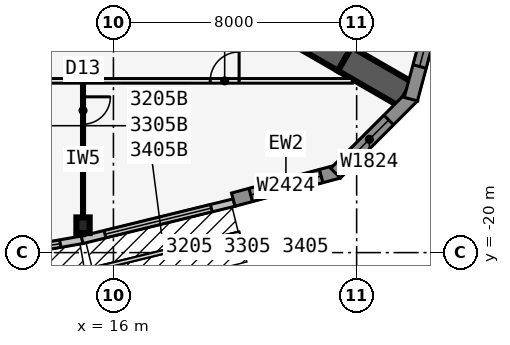
"""IFC4 building model, lengths in metres.
Left out: names, types, materials, properties, quantities, classifications, styles, units other than length and angle.
Written with IfcOpenShell. Run it as: python <this file> out.ifc"""

import sys

from ifc_helpers import new_model, si_unit, direction, frame, frame_2d, origin, origin_2d, place, context, subcontext, project, spatial, polyline, rectangle, i_section, outline, extrude, element, fill, save


model = new_model("IFC4")
c1 = context("Model", 3, precision=1e-05, world=origin(), true_north=direction((0.0, 1.0)))
c2 = subcontext(c1, "Body", "Model", "MODEL_VIEW")
j1 = project(units=[si_unit("LENGTHUNIT", "METRE"), si_unit("PLANEANGLEUNIT", "RADIAN")], contexts=[c1])
p1 = place(None, origin())
s1 = spatial("IfcSite", under=j1, at=p1, CompositionType="ELEMENT")
p2 = place(p1, origin())
s2 = spatial("IfcBuilding", under=s1, at=p2, CompositionType="ELEMENT")
p3 = place(p2, frame((0.0, 0.0, 124.9)))
s3 = spatial("IfcBuildingStorey", under=s2, at=p3, CompositionType="ELEMENT", Elevation=124.9)
for number, where, z_axis, x_axis in (
    (1, (21.61, -12.477, 0.0), (0.0, 0.0, 1.0), (0.866, -0.5, 0.0)),
    (2, (23.61, -13.631, 0.0), (0.0, 0.0, 1.0), (0.866, -0.5, 0.0)),
):
    element("IfcWall", number, at=place(p3, frame(where, z_axis=z_axis, x_axis=x_axis)), inside=s3, PredefinedType="SHEAR", context=c2, shape_type="SweptSolid", body=[
        extrude(rectangle(XDim=2.309, YDim=0.9, at=frame_2d((1.155, 0.0))), origin(), (0.0, 0.0, 1.0), 3.4),
    ])
p4 = place(p3, frame((15.0, -19.1, 0.0), z_axis=(0.0, 0.0, 1.0), x_axis=(1.0, 0.0, 0.0)))
e3 = element("IfcColumn", 3, at=p4, inside=s3, PredefinedType="COLUMN", context=c2, shape_type="SweptSolid", body=[
    extrude(i_section(OverallWidth=0.437, OverallDepth=0.513, WebThickness=0.061, FlangeThickness=0.097, at=origin_2d()), origin(), (0.0, 0.0, 1.0), 3.4),
])
p5 = place(p3, frame((9.979, -20.452, 0.0), z_axis=(0.0, 0.0, 1.0), x_axis=(0.985030467156, 0.172380331752, 0.0)))
e4 = element("IfcWall", 4, at=p5, inside=s3, PredefinedType="STANDARD", context=c2, shape_type="SweptSolid", body=[
    extrude(rectangle(XDim=5.076, YDim=0.25, at=frame_2d((2.538, 0.0))), origin(), (0.0, 0.0, 1.0), 3.235),
])
p6 = place(p5, frame((0.738, 0.0, 0.45)))
e5 = element("IfcOpeningElement", 5, at=p6, cuts=e4, PredefinedType="OPENING", context=c2, shape_type="SweptSolid", body=[
    extrude(rectangle(XDim=3.6, YDim=2.4, at=frame_2d((1.8, 1.2))), frame((0.0, 0.135, 0.0), z_axis=(0.0, -1.0, 0.0), x_axis=(1.0, 0.0, 0.0)), (0.0, 0.0, 1.0), 0.27),
])
p7 = place(p3, frame((14.97, -19.579, 0.0), z_axis=(0.0, 0.0, 1.0), x_axis=(0.971270024053, 0.237980126011, 0.0)))
e6 = element("IfcWall", 6, at=p7, inside=s3, PredefinedType="STANDARD", context=c2, shape_type="SweptSolid", body=[
    extrude(rectangle(XDim=5.148, YDim=0.25, at=frame_2d((2.574, 0.0))), origin(), (0.0, 0.0, 1.0), 3.235),
])
p8 = place(p7, frame((0.774, 0.0, 0.45)))
e7 = element("IfcOpeningElement", 7, at=p8, cuts=e6, PredefinedType="OPENING", context=c2, shape_type="SweptSolid", body=[
    extrude(rectangle(XDim=3.6, YDim=2.4, at=frame_2d((1.8, 1.2))), frame((0.0, 0.135, 0.0), z_axis=(0.0, -1.0, 0.0), x_axis=(1.0, 0.0, 0.0)), (0.0, 0.0, 1.0), 0.27),
])
p9 = place(p3, frame((19.942, -18.258, 0.0), z_axis=(0.0, 0.0, 1.0), x_axis=(0.965924653531, 0.258823421857, 0.0)))
e8 = element("IfcWall", 8, at=p9, inside=s3, PredefinedType="SOLIDWALL", context=c2, shape_type="SweptSolid", body=[
    extrude(rectangle(XDim=3.586, YDim=0.45, at=frame_2d((1.793, 0.0))), origin(), (0.0, 0.0, 1.0), 3.235),
])
p10 = place(p9, frame((0.593, 0.0, 0.45)))
e9 = element("IfcOpeningElement", 9, at=p10, cuts=e8, PredefinedType="OPENING", context=c2, shape_type="SweptSolid", body=[
    extrude(rectangle(XDim=2.4, YDim=2.4, at=frame_2d((1.2, 1.2))), frame((0.0, 0.235, 0.0), z_axis=(0.0, -1.0, 0.0), x_axis=(1.0, 0.0, 0.0)), (0.0, 0.0, 1.0), 0.47),
])
p11 = place(p3, frame((23.305, -17.388, 0.0), z_axis=(0.0, 0.0, 1.0), x_axis=(0.707106781187, 0.707106781187, 0.0)))
e10 = element("IfcWall", 10, at=p11, inside=s3, PredefinedType="SOLIDWALL", context=c2, shape_type="SweptSolid", body=[
    extrude(outline(polyline([(3.586, 0.225), (3.527, 0.225), (3.035, 0.093), (3.0, 0.225), (0.0, 0.225), (0.0, -0.225), (3.586, -0.225), (3.586, 0.225)])), origin(), (0.0, 0.0, 1.0), 3.235),
])
p12 = place(p11, frame((0.675, 0.0, 0.45)))
e11 = element("IfcOpeningElement", 11, at=p12, cuts=e10, PredefinedType="OPENING", context=c2, shape_type="SweptSolid", body=[
    extrude(rectangle(XDim=1.8, YDim=2.4, at=frame_2d((0.9, 1.2))), frame((0.0, 0.235, 0.0), z_axis=(0.0, -1.0, 0.0), x_axis=(1.0, 0.0, 0.0)), (0.0, 0.0, 1.0), 0.47),
])
p13 = place(p3, frame((25.783, -14.953, 0.0), z_axis=(0.0, 0.0, 1.0), x_axis=(0.258823421857, 0.965924653531, 0.0)))
e12 = element("IfcWall", 12, at=p13, inside=s3, PredefinedType="SOLIDWALL", context=c2, shape_type="SweptSolid", body=[
    extrude(outline(polyline([(3.586, 0.225), (0.586, 0.225), (0.551, 0.093), (0.06, 0.225), (0.0, 0.225), (0.0, -0.225), (3.586, -0.225), (3.586, 0.225)])), origin(), (0.0, 0.0, 1.0), 3.235),
])
p14 = place(p13, frame((1.111, 0.0, 0.45)))
e13 = element("IfcOpeningElement", 13, at=p14, cuts=e12, PredefinedType="OPENING", context=c2, shape_type="SweptSolid", body=[
    extrude(rectangle(XDim=1.8, YDim=2.4, at=frame_2d((0.9, 1.2))), frame((0.0, 0.235, 0.0), z_axis=(0.0, -1.0, 0.0), x_axis=(1.0, 0.0, 0.0)), (0.0, 0.0, 1.0), 0.47),
])
p15 = place(p3, frame((-23.857, -14.351, 0.0), z_axis=(0.0, 0.0, 1.0), x_axis=(1.0, 0.0, 0.0)))
e14 = element("IfcWall", 14, at=p15, inside=s3, PredefinedType="PARTITIONING", context=c2, shape_type="SweptSolid", body=[
    extrude(rectangle(XDim=47.714, YDim=0.15, at=frame_2d((23.857, 0.0))), origin(), (0.0, 0.0, 1.0), 3.235),
])
p16 = place(p15, frame((4.682, 0.0, 0.0)))
e15 = element("IfcOpeningElement", 15, at=p16, cuts=e14, PredefinedType="OPENING", context=c2, shape_type="SweptSolid", body=[
    extrude(rectangle(XDim=0.95, YDim=2.13, at=frame_2d((0.475, 1.065))), frame((0.0, 0.085, 0.0), z_axis=(0.0, -1.0, 0.0), x_axis=(1.0, 0.0, 0.0)), (0.0, 0.0, 1.0), 0.17),
])
p17 = place(p15, frame((14.682, 0.0, 0.0)))
e16 = element("IfcOpeningElement", 16, at=p17, cuts=e14, PredefinedType="OPENING", context=c2, shape_type="SweptSolid", body=[
    extrude(rectangle(XDim=0.95, YDim=2.13, at=frame_2d((0.475, 1.065))), frame((0.0, 0.085, 0.0), z_axis=(0.0, -1.0, 0.0), x_axis=(1.0, 0.0, 0.0)), (0.0, 0.0, 1.0), 0.17),
])
p18 = place(p15, frame((21.482, 0.0, 0.0)))
e17 = element("IfcOpeningElement", 17, at=p18, cuts=e14, PredefinedType="OPENING", context=c2, shape_type="SweptSolid", body=[
    extrude(rectangle(XDim=0.95, YDim=2.13, at=frame_2d((0.475, 1.065))), frame((0.0, 0.085, 0.0), z_axis=(0.0, -1.0, 0.0), x_axis=(1.0, 0.0, 0.0)), (0.0, 0.0, 1.0), 0.17),
])
p19 = place(p15, frame((25.857, 0.0, 0.0)))
e18 = element("IfcOpeningElement", 18, at=p19, cuts=e14, PredefinedType="OPENING", context=c2, shape_type="SweptSolid", body=[
    extrude(rectangle(XDim=1.0, YDim=2.13, at=frame_2d((0.5, 1.065))), frame((0.0, 0.085, 0.0), z_axis=(0.0, -1.0, 0.0), x_axis=(1.0, 0.0, 0.0)), (0.0, 0.0, 1.0), 0.17),
])
p20 = place(p15, frame((30.282, 0.0, 0.0)))
e19 = element("IfcOpeningElement", 19, at=p20, cuts=e14, PredefinedType="OPENING", context=c2, shape_type="SweptSolid", body=[
    extrude(rectangle(XDim=0.95, YDim=2.13, at=frame_2d((0.475, 1.065))), frame((0.0, 0.085, 0.0), z_axis=(0.0, -1.0, 0.0), x_axis=(1.0, 0.0, 0.0)), (0.0, 0.0, 1.0), 0.17),
])
p21 = place(p15, frame((43.041, 0.0, 0.0)))
e20 = element("IfcOpeningElement", 20, at=p21, cuts=e14, PredefinedType="OPENING", context=c2, shape_type="SweptSolid", body=[
    extrude(rectangle(XDim=0.95, YDim=2.13, at=frame_2d((0.475, 1.065))), frame((0.0, 0.085, 0.0), z_axis=(0.0, -1.0, 0.0), x_axis=(1.0, 0.0, 0.0)), (0.0, 0.0, 1.0), 0.17),
])
p22 = place(p3, frame((15.0, -14.426, 0.0), z_axis=(0.0, 0.0, 1.0), x_axis=(0.0, -1.0, 0.0)))
e21 = element("IfcWall", 21, at=p22, inside=s3, PredefinedType="PARTITIONING", context=c2, shape_type="SweptSolid", body=[
    extrude(rectangle(XDim=5.017, YDim=0.1, at=frame_2d((2.508, 0.0))), origin(), (0.0, 0.0, 1.0), 2.389),
])
p23 = place(p22, frame((0.45, 0.0, 0.0)))
e22 = element("IfcOpeningElement", 22, at=p23, cuts=e21, PredefinedType="OPENING", context=c2, shape_type="SweptSolid", body=[
    extrude(rectangle(XDim=0.9, YDim=2.13, at=frame_2d((0.45, 1.065))), frame((0.0, 0.06, 0.0), z_axis=(0.0, -1.0, 0.0), x_axis=(1.0, 0.0, 0.0)), (0.0, 0.0, 1.0), 0.12),
])
p24 = place(p6, origin())
e23 = element("IfcWindow", 23, at=p24, inside=s3, PartitioningType="SINGLE_PANEL", PredefinedType="WINDOW", context=c2, shape_type="SweptSolid", body=[
    extrude(rectangle(XDim=3.6, YDim=2.4, at=frame_2d((1.8, 1.2))), frame((0.0, 0.03, 0.0), z_axis=(0.0, -1.0, 0.0), x_axis=(1.0, 0.0, 0.0)), (0.0, 0.0, 1.0), 0.06),
])
fill(e5, e23)
p25 = place(p8, origin())
e24 = element("IfcWindow", 24, at=p25, inside=s3, PartitioningType="SINGLE_PANEL", PredefinedType="WINDOW", context=c2, shape_type="SweptSolid", body=[
    extrude(rectangle(XDim=3.6, YDim=2.4, at=frame_2d((1.8, 1.2))), frame((0.0, 0.03, 0.0), z_axis=(0.0, -1.0, 0.0), x_axis=(1.0, 0.0, 0.0)), (0.0, 0.0, 1.0), 0.06),
])
fill(e7, e24)
p26 = place(p10, origin())
e25 = element("IfcWindow", 25, at=p26, inside=s3, PartitioningType="SINGLE_PANEL", PredefinedType="WINDOW", context=c2, shape_type="SweptSolid", body=[
    extrude(rectangle(XDim=2.4, YDim=2.4, at=frame_2d((1.2, 1.2))), frame((0.0, 0.03, 0.0), z_axis=(0.0, -1.0, 0.0), x_axis=(1.0, 0.0, 0.0)), (0.0, 0.0, 1.0), 0.06),
])
fill(e9, e25)
p27 = place(p12, origin())
e26 = element("IfcWindow", 26, at=p27, inside=s3, PartitioningType="SINGLE_PANEL", PredefinedType="WINDOW", context=c2, shape_type="SweptSolid", body=[
    extrude(rectangle(XDim=1.8, YDim=2.4, at=frame_2d((0.9, 1.2))), frame((0.0, 0.03, 0.0), z_axis=(0.0, -1.0, 0.0), x_axis=(1.0, 0.0, 0.0)), (0.0, 0.0, 1.0), 0.06),
])
fill(e11, e26)
p28 = place(p14, origin())
e27 = element("IfcWindow", 27, at=p28, inside=s3, PartitioningType="SINGLE_PANEL", PredefinedType="WINDOW", context=c2, shape_type="SweptSolid", body=[
    extrude(rectangle(XDim=1.8, YDim=2.4, at=frame_2d((0.9, 1.2))), frame((0.0, 0.03, 0.0), z_axis=(0.0, -1.0, 0.0), x_axis=(1.0, 0.0, 0.0)), (0.0, 0.0, 1.0), 0.06),
])
fill(e13, e27)
p29 = place(p23, origin())
e28 = element("IfcDoor", 28, at=p29, inside=s3, OperationType="SINGLE_SWING_LEFT", PredefinedType="DOOR", context=c2, shape_type="SweptSolid", body=[
    extrude(rectangle(XDim=0.9, YDim=2.13, at=frame_2d((0.45, 1.065))), frame((0.0, 0.025, 0.0), z_axis=(0.0, -1.0, 0.0), x_axis=(1.0, 0.0, 0.0)), (0.0, 0.0, 1.0), 0.05),
])
fill(e22, e28)
p30 = place(p21, origin())
e29 = element("IfcDoor", 29, at=p30, inside=s3, OperationType="SINGLE_SWING_RIGHT", PredefinedType="DOOR", context=c2, shape_type="SweptSolid", body=[
    extrude(rectangle(XDim=0.95, YDim=2.13, at=frame_2d((0.475, 1.065))), frame((0.0, 0.025, 0.0), z_axis=(0.0, -1.0, 0.0), x_axis=(1.0, 0.0, 0.0)), (0.0, 0.0, 1.0), 0.05),
])
fill(e20, e29)
save(model, sys.argv[1])
